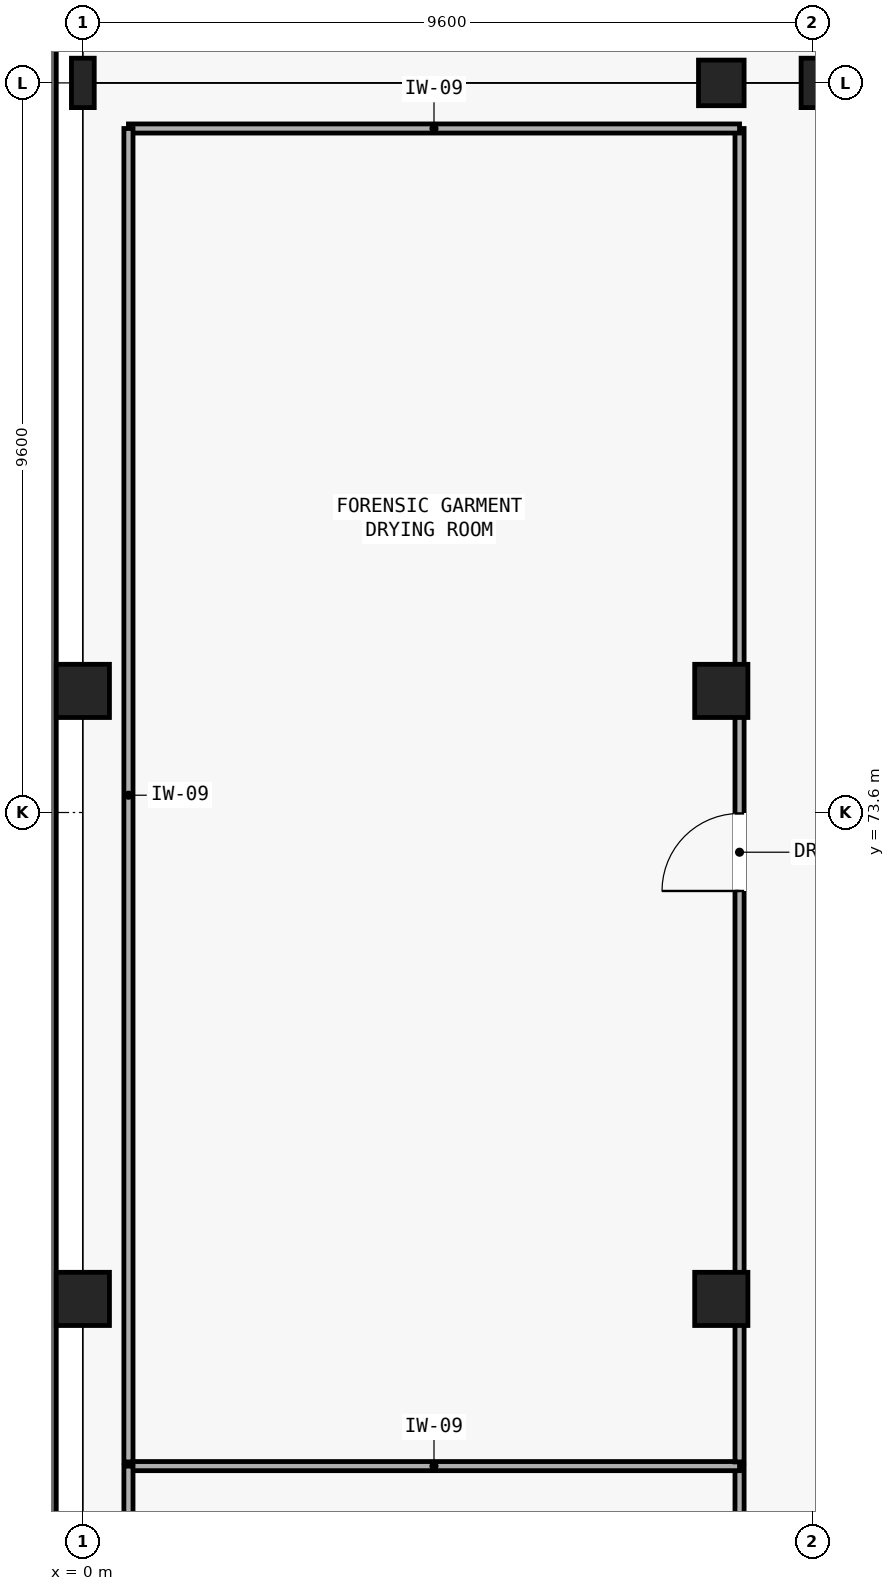
"""IFC4 building model, lengths in metres.
Left out: names, types, materials, properties, quantities, classifications, styles, units other than length and angle.
Written with IfcOpenShell. Run it as: python <this file> out.ifc"""

import sys

from ifc_helpers import new_model, si_unit, direction, frame, frame_2d, origin, origin_2d, place, context, subcontext, project, spatial, rectangle, i_section, extrude, element, fill, save


model = new_model("IFC4")
c1 = context("Model", 3, precision=1e-05, world=origin(), true_north=direction((0.0, 1.0)))
c2 = subcontext(c1, "Body", "Model", "MODEL_VIEW")
j1 = project(units=[si_unit("LENGTHUNIT", "METRE"), si_unit("PLANEANGLEUNIT", "RADIAN")], contexts=[c1])
p1 = place(None, origin())
s1 = spatial("IfcSite", under=j1, at=p1, CompositionType="ELEMENT")
p2 = place(p1, origin())
s2 = spatial("IfcBuilding", under=s1, at=p2, CompositionType="ELEMENT")
p3 = place(p2, frame((0.0, 0.0, -4.55)))
s3 = spatial("IfcBuildingStorey", under=s2, at=p3, CompositionType="ELEMENT", Elevation=-4.55)
for number, where, z_axis, x_axis in (
    (1, (0.0, 83.2, 0.0), (0.0, 0.0, 1.0), (1.0, 0.0, 0.0)),
    (2, (9.6, 83.2, 0.0), (0.0, 0.0, 1.0), (1.0, 0.0, 0.0)),
):
    element("IfcColumn", number, at=place(p3, frame(where, z_axis=z_axis, x_axis=x_axis)), inside=s3, PredefinedType="COLUMN", context=c2, shape_type="SweptSolid", body=[
        extrude(i_section(OverallWidth=0.3, OverallDepth=0.65, WebThickness=0.016, FlangeThickness=0.031, FilletRadius=0.027, at=origin_2d()), origin(), (0.0, 0.0, 1.0), 4.55),
    ])
for number, where, z_axis, x_axis in (
    (3, (0.0, 67.2, 0.0), (0.0, 0.0, 1.0), (1.0, 0.0, 0.0)),
    (4, (8.4, 67.2, 0.0), (0.0, 0.0, 1.0), (1.0, 0.0, 0.0)),
    (5, (0.0, 75.2, 0.0), (0.0, 0.0, 1.0), (1.0, 0.0, 0.0)),
    (6, (8.4, 75.2, 0.0), (0.0, 0.0, 1.0), (1.0, 0.0, 0.0)),
):
    element("IfcColumn", number, at=place(p3, frame(where, z_axis=z_axis, x_axis=x_axis)), inside=s3, PredefinedType="COLUMN", context=c2, shape_type="SweptSolid", body=[
        extrude(rectangle(XDim=0.7, YDim=0.7, at=origin_2d()), origin(), (0.0, 0.0, 1.0), 4.55),
    ])
p4 = place(p3, frame((8.4, 83.2, 0.0), z_axis=(0.0, 0.0, 1.0), x_axis=(1.0, 0.0, 0.0)))
e7 = element("IfcColumn", 7, at=p4, inside=s3, PredefinedType="COLUMN", context=c2, shape_type="SweptSolid", body=[
    extrude(rectangle(XDim=0.6, YDim=0.6, at=origin_2d()), origin(), (0.0, 0.0, 1.0), 4.55),
])
p5 = place(p3, frame((-0.55, 28.25, 0.0), z_axis=(0.0, 0.0, 1.0), x_axis=(0.0, 1.0, 0.0)))
e8 = element("IfcWall", 8, at=p5, inside=s3, PredefinedType="USERDEFINED", context=c2, shape_type="SweptSolid", body=[
    extrude(rectangle(XDim=89.1, YDim=0.4, at=frame_2d((44.55, 0.0))), origin(), (0.0, 0.0, 1.0), 4.28),
])
p6 = place(p3, frame((8.64, 48.25, 0.0), z_axis=(0.0, 0.0, 1.0), x_axis=(0.0, 1.0, 0.0)))
e9 = element("IfcWall", 9, at=p6, inside=s3, PredefinedType="PARTITIONING", context=c2, shape_type="SweptSolid", body=[
    extrude(rectangle(XDim=16.75, YDim=0.12, at=frame_2d((8.375, 0.0))), origin(), (0.0, 0.0, 1.0), 3.82),
])
p7 = place(p6, frame((6.885, 0.0, 0.0)))
e10 = element("IfcOpeningElement", 10, at=p7, cuts=e9, PredefinedType="OPENING", context=c2, shape_type="SweptSolid", body=[
    extrude(rectangle(XDim=0.98, YDim=2.1, at=frame_2d((0.49, 1.05))), frame((0.0, 0.07, 0.0), z_axis=(0.0, -1.0, 0.0), x_axis=(1.0, 0.0, 0.0)), (0.0, 0.0, 1.0), 0.14),
])
p8 = place(p3, frame((8.64, 65.0, 0.0), z_axis=(0.0, 0.0, 1.0), x_axis=(-1.0, 0.0, 0.0)))
e11 = element("IfcWall", 11, at=p8, inside=s3, PredefinedType="PARTITIONING", context=c2, shape_type="SweptSolid", body=[
    extrude(rectangle(XDim=8.04, YDim=0.12, at=frame_2d((4.02, 0.0))), origin(), (0.0, 0.0, 1.0), 4.28),
])
p9 = place(p3, frame((0.6, 65.0, 0.0), z_axis=(0.0, 0.0, 1.0), x_axis=(0.0, -1.0, 0.0)))
e12 = element("IfcWall", 12, at=p9, inside=s3, PredefinedType="PARTITIONING", context=c2, shape_type="SweptSolid", body=[
    extrude(rectangle(XDim=16.75, YDim=0.12, at=frame_2d((8.375, 0.0))), origin(), (0.0, 0.0, 1.0), 4.28),
])
p10 = place(p3, frame((8.64, 65.055, 0.0), z_axis=(0.0, 0.0, 1.0), x_axis=(0.0, 1.0, 0.0)))
e13 = element("IfcWall", 13, at=p10, inside=s3, PredefinedType="PARTITIONING", context=c2, shape_type="SweptSolid", body=[
    extrude(rectangle(XDim=17.545, YDim=0.12, at=frame_2d((8.772, 0.0))), origin(), (0.0, 0.0, 1.0), 3.82),
])
p11 = place(p10, frame((7.512, 0.0, 0.0)))
e14 = element("IfcOpeningElement", 14, at=p11, cuts=e13, PredefinedType="OPENING", context=c2, shape_type="SweptSolid", body=[
    extrude(rectangle(XDim=1.02, YDim=2.1, at=frame_2d((0.51, 1.05))), frame((0.0, 0.07, 0.0), z_axis=(0.0, -1.0, 0.0), x_axis=(1.0, 0.0, 0.0)), (0.0, 0.0, 1.0), 0.14),
])
p12 = place(p3, frame((8.64, 82.6, 0.0), z_axis=(0.0, 0.0, 1.0), x_axis=(-1.0, 0.0, 0.0)))
e15 = element("IfcWall", 15, at=p12, inside=s3, PredefinedType="PARTITIONING", context=c2, shape_type="SweptSolid", body=[
    extrude(rectangle(XDim=8.04, YDim=0.12, at=frame_2d((4.02, 0.0))), origin(), (0.0, 0.0, 1.0), 4.28),
])
p13 = place(p3, frame((0.6, 82.6, 0.0), z_axis=(0.0, 0.0, 1.0), x_axis=(0.0, -1.0, 0.0)))
e16 = element("IfcWall", 16, at=p13, inside=s3, PredefinedType="PARTITIONING", context=c2, shape_type="SweptSolid", body=[
    extrude(rectangle(XDim=17.545, YDim=0.12, at=frame_2d((8.772, 0.0))), origin(), (0.0, 0.0, 1.0), 4.28),
])
p14 = place(p11, origin())
e17 = element("IfcDoor", 17, at=p14, inside=s3, OperationType="SINGLE_SWING_LEFT", PredefinedType="DOOR", context=c2, shape_type="SweptSolid", body=[
    extrude(rectangle(XDim=1.02, YDim=2.1, at=frame_2d((0.51, 1.05))), frame((0.0, 0.025, 0.0), z_axis=(0.0, -1.0, 0.0), x_axis=(1.0, 0.0, 0.0)), (0.0, 0.0, 1.0), 0.05),
])
fill(e14, e17)
save(model, sys.argv[1])
